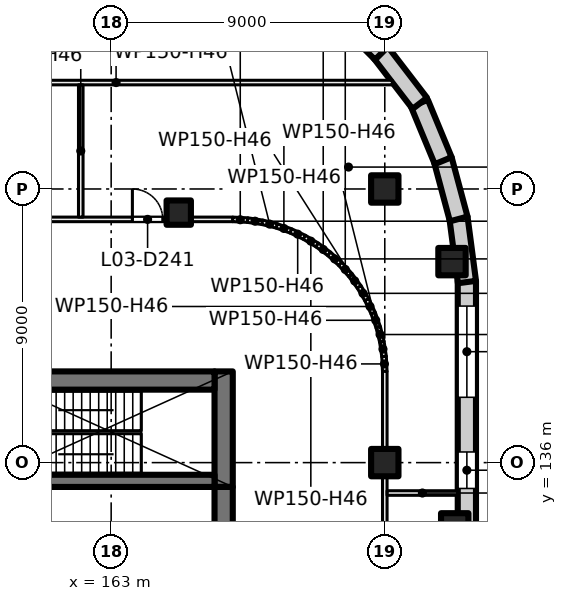
"""IFC4 building model, lengths in metres.
Left out: names, types, materials, properties, quantities, classifications, styles, units other than length and angle.
Written with IfcOpenShell. Run it as: python <this file> out.ifc"""

import sys

from ifc_helpers import new_model, si_unit, direction, frame, frame_2d, origin, origin_2d, place, context, subcontext, project, spatial, rectangle, extrude, element, fill, save


model = new_model("IFC4")
c1 = context("Model", 3, precision=1e-05, world=origin(), true_north=direction((0.0, 1.0)))
c2 = subcontext(c1, "Body", "Model", "MODEL_VIEW")
j1 = project(units=[si_unit("LENGTHUNIT", "METRE"), si_unit("PLANEANGLEUNIT", "RADIAN")], contexts=[c1])
p1 = place(None, origin())
s1 = spatial("IfcSite", under=j1, at=p1, CompositionType="ELEMENT")
p2 = place(p1, origin())
s2 = spatial("IfcBuilding", under=s1, at=p2, CompositionType="ELEMENT")
p3 = place(p2, frame((0.0, 0.0, 17.5)))
s3 = spatial("IfcBuildingStorey", under=s2, at=p3, CompositionType="ELEMENT", Elevation=17.5)
for number, where, z_axis, x_axis in (
    (1, (172.0, 136.0, 0.0), (0.0, 0.0, 1.0), (1.0, 0.0, 0.0)),
    (2, (172.0, 145.0, 0.0), (0.0, 0.0, 1.0), (1.0, 0.0, 0.0)),
    (3, (174.211, 142.611, 0.0), (0.0, 0.0, 1.0), (1.0, 0.0, 0.0)),
    (4, (174.3, 133.887, 0.0), (0.0, 0.0, 1.0), (1.0, 0.0, 0.0)),
):
    element("IfcColumn", number, at=place(p3, frame(where, z_axis=z_axis, x_axis=x_axis)), inside=s3, PredefinedType="COLUMN", context=c2, shape_type="SweptSolid", body=[
        extrude(rectangle(XDim=0.9, YDim=0.9, at=origin_2d()), origin(), (0.0, 0.0, 1.0), 5.0),
    ])
p4 = place(p3, frame((165.223, 144.223, 0.0), z_axis=(0.0, 0.0, 1.0), x_axis=(1.0, 0.0, 0.0)))
e5 = element("IfcColumn", 5, at=p4, inside=s3, PredefinedType="COLUMN", context=c2, shape_type="SweptSolid", body=[
    extrude(rectangle(XDim=0.8, YDim=0.8, at=origin_2d()), origin(), (0.0, 0.0, 1.0), 5.0),
])
p5 = place(p3, frame((166.7, 139.0, 0.0), z_axis=(0.0, 0.0, 1.0), x_axis=(0.0, -1.0, 0.0)))
e6 = element("IfcWall", 6, at=p5, inside=s3, PredefinedType="SHEAR", context=c2, shape_type="SweptSolid", body=[
    extrude(rectangle(XDim=3.8, YDim=0.6, at=frame_2d((1.9, 0.0))), origin(), (0.0, 0.0, 1.0), 5.0),
])
p6 = place(p3, frame((166.7, 135.2, 0.0), z_axis=(0.0, 0.0, 1.0), x_axis=(0.0, -1.0, 0.0)))
e7 = element("IfcWall", 7, at=p6, inside=s3, PredefinedType="SHEAR", context=c2, shape_type="SweptSolid", body=[
    extrude(rectangle(XDim=14.4, YDim=0.6, at=frame_2d((7.2, 0.0))), origin(), (0.0, 0.0, 1.0), 5.0),
])
p7 = place(p3, frame((166.4, 138.7, 0.0), z_axis=(0.0, 0.0, 1.0), x_axis=(-1.0, 0.0, 0.0)))
e8 = element("IfcWall", 8, at=p7, inside=s3, PredefinedType="SHEAR", context=c2, shape_type="SweptSolid", body=[
    extrude(rectangle(XDim=7.8, YDim=0.6, at=frame_2d((3.9, 0.0))), origin(), (0.0, 0.0, 1.0), 5.0),
])
p8 = place(p3, frame((166.4, 135.4, 0.0), z_axis=(0.0, 0.0, 1.0), x_axis=(-1.0, 0.0, 0.0)))
e9 = element("IfcWall", 9, at=p8, inside=s3, PredefinedType="SHEAR", context=c2, shape_type="SweptSolid", body=[
    extrude(rectangle(XDim=7.8, YDim=0.4, at=frame_2d((3.9, 0.0))), origin(), (0.0, 0.0, 1.0), 5.0),
])
p9 = place(p3, frame((174.7, 141.978, 0.0), z_axis=(0.0, 0.0, 1.0), x_axis=(0.0, -1.0, 0.0)))
e10 = element("IfcWall", 10, at=p9, inside=s3, PredefinedType="SOLIDWALL", context=c2, shape_type="SweptSolid", body=[
    extrude(rectangle(XDim=27.957, YDim=0.6, at=frame_2d((13.978, 0.0))), origin(), (0.0, 0.0, 1.0), 4.6),
])
p10 = place(p9, frame((0.83, 0.0, 0.9)))
e11 = element("IfcOpeningElement", 11, at=p10, cuts=e10, PredefinedType="OPENING", context=c2, shape_type="SweptSolid", body=[
    extrude(rectangle(XDim=3.0, YDim=3.0, at=frame_2d((1.5, 1.5))), frame((0.0, 0.31, 0.0), z_axis=(0.0, -1.0, 0.0), x_axis=(1.0, 0.0, 0.0)), (0.0, 0.0, 1.0), 0.62),
])
p11 = place(p9, frame((5.628, 0.0, 0.9)))
e12 = element("IfcOpeningElement", 12, at=p11, cuts=e10, PredefinedType="OPENING", context=c2, shape_type="SweptSolid", body=[
    extrude(rectangle(XDim=1.2, YDim=3.0, at=frame_2d((0.6, 1.5))), frame((0.0, 0.31, 0.0), z_axis=(0.0, -1.0, 0.0), x_axis=(1.0, 0.0, 0.0)), (0.0, 0.0, 1.0), 0.62),
])
p12 = place(p9, frame((10.148, 0.0, 0.9)))
e13 = element("IfcOpeningElement", 13, at=p12, cuts=e10, PredefinedType="OPENING", context=c2, shape_type="SweptSolid", body=[
    extrude(rectangle(XDim=3.0, YDim=3.0, at=frame_2d((1.5, 1.5))), frame((0.0, 0.31, 0.0), z_axis=(0.0, -1.0, 0.0), x_axis=(1.0, 0.0, 0.0)), (0.0, 0.0, 1.0), 0.62),
])
p13 = place(p9, frame((19.128, 0.0, 0.9)))
e14 = element("IfcOpeningElement", 14, at=p13, cuts=e10, PredefinedType="OPENING", context=c2, shape_type="SweptSolid", body=[
    extrude(rectangle(XDim=1.2, YDim=3.0, at=frame_2d((0.6, 1.5))), frame((0.0, 0.31, 0.0), z_axis=(0.0, -1.0, 0.0), x_axis=(1.0, 0.0, 0.0)), (0.0, 0.0, 1.0), 0.62),
])
p14 = place(p9, frame((20.628, 0.0, 0.9)))
e15 = element("IfcOpeningElement", 15, at=p14, cuts=e10, PredefinedType="OPENING", context=c2, shape_type="SweptSolid", body=[
    extrude(rectangle(XDim=1.2, YDim=3.0, at=frame_2d((0.6, 1.5))), frame((0.0, 0.31, 0.0), z_axis=(0.0, -1.0, 0.0), x_axis=(1.0, 0.0, 0.0)), (0.0, 0.0, 1.0), 0.62),
])
p15 = place(p3, frame((174.424, 144.052, 0.0), z_axis=(0.0, 0.0, 1.0), x_axis=(0.130558200013, -0.991440646942, 0.0)))
e16 = element("IfcWall", 16, at=p15, inside=s3, PredefinedType="SOLIDWALL", context=c2, shape_type="SweptSolid", body=[
    extrude(rectangle(XDim=2.132, YDim=0.6, at=frame_2d((1.066, 0.0))), origin(), (0.0, 0.0, 1.0), 4.6),
])
p16 = place(p3, frame((173.908, 145.968, 0.0), z_axis=(0.0, 0.0, 1.0), x_axis=(0.258804467146, -0.965929732323, 0.0)))
e17 = element("IfcWall", 17, at=p16, inside=s3, PredefinedType="SOLIDWALL", context=c2, shape_type="SweptSolid", body=[
    extrude(rectangle(XDim=2.022, YDim=0.6, at=frame_2d((1.011, 0.0))), origin(), (0.0, 0.0, 1.0), 4.6),
])
p17 = place(p3, frame((173.14, 147.819, 0.0), z_axis=(0.0, 0.0, 1.0), x_axis=(0.382341242798, -0.924021197839, 0.0)))
e18 = element("IfcWall", 18, at=p17, inside=s3, PredefinedType="SOLIDWALL", context=c2, shape_type="SweptSolid", body=[
    extrude(rectangle(XDim=2.044, YDim=0.6, at=frame_2d((1.022, 0.0))), origin(), (0.0, 0.0, 1.0), 4.6),
])
p18 = place(p3, frame((171.865, 149.493, 0.0), z_axis=(0.0, 0.0, 1.0), x_axis=(0.609052002567, -0.79313029079, 0.0)))
e19 = element("IfcWall", 19, at=p18, inside=s3, PredefinedType="SOLIDWALL", context=c2, shape_type="SweptSolid", body=[
    extrude(rectangle(XDim=2.114, YDim=0.6, at=frame_2d((1.057, 0.0))), origin(), (0.0, 0.0, 1.0), 4.6),
])
p19 = place(p3, frame((170.463, 150.89, 0.0), z_axis=(0.0, 0.0, 1.0), x_axis=(0.707106781187, -0.707106781187, 0.0)))
e20 = element("IfcWall", 20, at=p19, inside=s3, PredefinedType="SOLIDWALL", context=c2, shape_type="SweptSolid", body=[
    extrude(rectangle(XDim=2.018, YDim=0.6, at=frame_2d((1.009, 0.0))), origin(), (0.0, 0.0, 1.0), 4.6),
])
p20 = place(p3, frame((154.075, 144.0, 0.0), z_axis=(0.0, 0.0, 1.0), x_axis=(1.0, 0.0, 0.0)))
e21 = element("IfcWall", 21, at=p20, inside=s3, PredefinedType="PARTITIONING", context=c2, shape_type="SweptSolid", body=[
    extrude(rectangle(XDim=12.927, YDim=0.15, at=frame_2d((6.463, 0.0))), origin(), (0.0, 0.0, 1.0), 4.6),
])
p21 = place(p20, frame((2.427, 0.0, 0.0)))
e22 = element("IfcOpeningElement", 22, at=p21, cuts=e21, PredefinedType="OPENING", context=c2, shape_type="SweptSolid", body=[
    extrude(rectangle(XDim=1.0, YDim=2.1, at=frame_2d((0.5, 1.05))), frame((0.0, 0.085, 0.0), z_axis=(0.0, -1.0, 0.0), x_axis=(1.0, 0.0, 0.0)), (0.0, 0.0, 1.0), 0.17),
])
p22 = place(p20, frame((9.623, 0.0, 0.0)))
e23 = element("IfcOpeningElement", 23, at=p22, cuts=e21, PredefinedType="OPENING", context=c2, shape_type="SweptSolid", body=[
    extrude(rectangle(XDim=1.0, YDim=2.1, at=frame_2d((0.5, 1.05))), frame((0.0, 0.085, 0.0), z_axis=(0.0, -1.0, 0.0), x_axis=(1.0, 0.0, 0.0)), (0.0, 0.0, 1.0), 0.17),
])
p23 = place(p3, frame((154.075, 148.5, 0.0), z_axis=(0.0, 0.0, 1.0), x_axis=(1.0, 0.0, 0.0)))
e24 = element("IfcWall", 24, at=p23, inside=s3, PredefinedType="PARTITIONING", context=c2, shape_type="SweptSolid", body=[
    extrude(rectangle(XDim=18.173, YDim=0.15, at=frame_2d((9.086, 0.0))), origin(), (0.0, 0.0, 1.0), 4.6),
])
p24 = place(p3, frame((162.0, 144.075, 0.0), z_axis=(0.0, 0.0, 1.0), x_axis=(0.0, 1.0, 0.0)))
e25 = element("IfcWall", 25, at=p24, inside=s3, PredefinedType="PARTITIONING", context=c2, shape_type="SweptSolid", body=[
    extrude(rectangle(XDim=4.35, YDim=0.15, at=frame_2d((2.175, 0.0))), origin(), (0.0, 0.0, 1.0), 4.6),
])
p25 = place(p3, frame((166.998, 144.0, 0.0), z_axis=(0.0, 0.0, 1.0), x_axis=(0.998837896651, -0.048196018647, 0.0)))
e26 = element("IfcWall", 26, at=p25, inside=s3, PredefinedType="PARTITIONING", context=c2, shape_type="SweptSolid", body=[
    extrude(rectangle(XDim=0.496, YDim=0.15, at=frame_2d((0.248, 0.0))), origin(), (0.0, 0.0, 1.0), 4.6),
])
p26 = place(p3, frame((167.486, 143.977, 0.0), z_axis=(0.0, 0.0, 1.0), x_axis=(0.988925572052, -0.148412307247, 0.0)))
e27 = element("IfcWall", 27, at=p26, inside=s3, PredefinedType="PARTITIONING", context=c2, shape_type="SweptSolid", body=[
    extrude(rectangle(XDim=0.499, YDim=0.15, at=frame_2d((0.249, 0.0))), origin(), (0.0, 0.0, 1.0), 4.6),
])
p27 = place(p3, frame((167.971, 143.905, 0.0), z_axis=(0.0, 0.0, 1.0), x_axis=(0.970113715952, -0.242650732785, 0.0)))
e28 = element("IfcWall", 28, at=p27, inside=s3, PredefinedType="PARTITIONING", context=c2, shape_type="SweptSolid", body=[
    extrude(rectangle(XDim=0.499, YDim=0.15, at=frame_2d((0.25, 0.0))), origin(), (0.0, 0.0, 1.0), 4.6),
])
for number, where, z_axis, x_axis in (
    (29, (168.447, 143.786, 0.0), (0.0, 0.0, 1.0), (0.941, -0.337, 0.0)),
    (30, (168.91, 143.621, 0.0), (0.0, 0.0, 1.0), (0.904, -0.428, 0.0)),
):
    element("IfcWall", number, at=place(p3, frame(where, z_axis=z_axis, x_axis=x_axis)), inside=s3, PredefinedType="PARTITIONING", context=c2, shape_type="SweptSolid", body=[
        extrude(rectangle(XDim=0.498, YDim=0.15, at=frame_2d((0.249, 0.0))), origin(), (0.0, 0.0, 1.0), 4.6),
    ])
p28 = place(p3, frame((169.354, 143.412, 0.0), z_axis=(0.0, 0.0, 1.0), x_axis=(0.85671397893, -0.515791778052, 0.0)))
e31 = element("IfcWall", 31, at=p28, inside=s3, PredefinedType="PARTITIONING", context=c2, shape_type="SweptSolid", body=[
    extrude(rectangle(XDim=0.499, YDim=0.15, at=frame_2d((0.249, 0.0))), origin(), (0.0, 0.0, 1.0), 4.6),
])
p29 = place(p3, frame((169.775, 143.159, 0.0), z_axis=(0.0, 0.0, 1.0), x_axis=(0.80404358372, -0.594570362092, 0.0)))
e32 = element("IfcWall", 32, at=p29, inside=s3, PredefinedType="PARTITIONING", context=c2, shape_type="SweptSolid", body=[
    extrude(rectangle(XDim=0.498, YDim=0.15, at=frame_2d((0.249, 0.0))), origin(), (0.0, 0.0, 1.0), 4.6),
])
for number, where, z_axis, x_axis in (
    (33, (170.169, 142.867, 0.0), (0.0, 0.0, 1.0), (0.742, -0.67, 0.0)),
    (34, (170.533, 142.539, 0.0), (0.0, 0.0, 1.0), (0.67, -0.742, 0.0)),
):
    element("IfcWall", number, at=place(p3, frame(where, z_axis=z_axis, x_axis=x_axis)), inside=s3, PredefinedType="PARTITIONING", context=c2, shape_type="SweptSolid", body=[
        extrude(rectangle(XDim=0.499, YDim=0.15, at=frame_2d((0.249, 0.0))), origin(), (0.0, 0.0, 1.0), 4.6),
    ])
p30 = place(p3, frame((170.863, 142.175, 0.0), z_axis=(0.0, 0.0, 1.0), x_axis=(0.594570362092, -0.80404358372, 0.0)))
e35 = element("IfcWall", 35, at=p30, inside=s3, PredefinedType="PARTITIONING", context=c2, shape_type="SweptSolid", body=[
    extrude(rectangle(XDim=0.498, YDim=0.15, at=frame_2d((0.249, 0.0))), origin(), (0.0, 0.0, 1.0), 4.6),
])
p31 = place(p3, frame((171.155, 141.781, 0.0), z_axis=(0.0, 0.0, 1.0), x_axis=(0.515791778052, -0.85671397893, 0.0)))
e36 = element("IfcWall", 36, at=p31, inside=s3, PredefinedType="PARTITIONING", context=c2, shape_type="SweptSolid", body=[
    extrude(rectangle(XDim=0.499, YDim=0.15, at=frame_2d((0.249, 0.0))), origin(), (0.0, 0.0, 1.0), 4.6),
])
for number, where, z_axis, x_axis in (
    (37, (171.408, 141.36, 0.0), (0.0, 0.0, 1.0), (0.428, -0.904, 0.0)),
    (38, (171.618, 140.916, 0.0), (0.0, 0.0, 1.0), (0.337, -0.941, 0.0)),
):
    element("IfcWall", number, at=place(p3, frame(where, z_axis=z_axis, x_axis=x_axis)), inside=s3, PredefinedType="PARTITIONING", context=c2, shape_type="SweptSolid", body=[
        extrude(rectangle(XDim=0.498, YDim=0.15, at=frame_2d((0.249, 0.0))), origin(), (0.0, 0.0, 1.0), 4.6),
    ])
p32 = place(p3, frame((171.784, 140.455, 0.0), z_axis=(0.0, 0.0, 1.0), x_axis=(0.242650732785, -0.970113715952, 0.0)))
e39 = element("IfcWall", 39, at=p32, inside=s3, PredefinedType="PARTITIONING", context=c2, shape_type="SweptSolid", body=[
    extrude(rectangle(XDim=0.499, YDim=0.15, at=frame_2d((0.25, 0.0))), origin(), (0.0, 0.0, 1.0), 4.6),
])
p33 = place(p3, frame((171.903, 139.979, 0.0), z_axis=(0.0, 0.0, 1.0), x_axis=(0.148412307247, -0.988925572052, 0.0)))
e40 = element("IfcWall", 40, at=p33, inside=s3, PredefinedType="PARTITIONING", context=c2, shape_type="SweptSolid", body=[
    extrude(rectangle(XDim=0.499, YDim=0.15, at=frame_2d((0.249, 0.0))), origin(), (0.0, 0.0, 1.0), 4.6),
])
p34 = place(p3, frame((171.976, 139.494, 0.0), z_axis=(0.0, 0.0, 1.0), x_axis=(0.048196018647, -0.998837896651, 0.0)))
e41 = element("IfcWall", 41, at=p34, inside=s3, PredefinedType="PARTITIONING", context=c2, shape_type="SweptSolid", body=[
    extrude(rectangle(XDim=0.496, YDim=0.15, at=frame_2d((0.248, 0.0))), origin(), (0.0, 0.0, 1.0), 4.6),
])
p35 = place(p3, frame((172.0, 139.002, 0.0), z_axis=(0.0, 0.0, 1.0), x_axis=(0.0, -1.0, 0.0)))
e42 = element("IfcWall", 42, at=p35, inside=s3, PredefinedType="PARTITIONING", context=c2, shape_type="SweptSolid", body=[
    extrude(rectangle(XDim=22.004, YDim=0.15, at=frame_2d((11.002, 0.0))), origin(), (0.0, 0.0, 1.0), 4.6),
])
p36 = place(p35, frame((10.252, 0.0, 0.0)))
e43 = element("IfcOpeningElement", 43, at=p36, cuts=e42, PredefinedType="OPENING", context=c2, shape_type="SweptSolid", body=[
    extrude(rectangle(XDim=1.0, YDim=2.1, at=frame_2d((0.5, 1.05))), frame((0.0, 0.085, 0.0), z_axis=(0.0, -1.0, 0.0), x_axis=(1.0, 0.0, 0.0)), (0.0, 0.0, 1.0), 0.17),
])
p37 = place(p3, frame((172.075, 135.0, 0.0), z_axis=(0.0, 0.0, 1.0), x_axis=(1.0, 0.0, 0.0)))
e44 = element("IfcWall", 44, at=p37, inside=s3, PredefinedType="PARTITIONING", context=c2, shape_type="SweptSolid", body=[
    extrude(rectangle(XDim=2.325, YDim=0.15, at=frame_2d((1.163, 0.0))), origin(), (0.0, 0.0, 1.0), 4.6),
])
p38 = place(p10, origin())
e45 = element("IfcWindow", 45, at=p38, inside=s3, PartitioningType="SINGLE_PANEL", PredefinedType="WINDOW", context=c2, shape_type="SweptSolid", body=[
    extrude(rectangle(XDim=3.0, YDim=3.0, at=frame_2d((1.5, 1.5))), frame((0.0, 0.03, 0.0), z_axis=(0.0, -1.0, 0.0), x_axis=(1.0, 0.0, 0.0)), (0.0, 0.0, 1.0), 0.06),
])
fill(e11, e45)
p39 = place(p11, origin())
e46 = element("IfcWindow", 46, at=p39, inside=s3, PartitioningType="SINGLE_PANEL", PredefinedType="WINDOW", context=c2, shape_type="SweptSolid", body=[
    extrude(rectangle(XDim=1.2, YDim=3.0, at=frame_2d((0.6, 1.5))), frame((0.0, 0.03, 0.0), z_axis=(0.0, -1.0, 0.0), x_axis=(1.0, 0.0, 0.0)), (0.0, 0.0, 1.0), 0.06),
])
fill(e12, e46)
p40 = place(p22, origin())
e47 = element("IfcDoor", 47, at=p40, inside=s3, OperationType="SINGLE_SWING_LEFT", PredefinedType="DOOR", context=c2, shape_type="SweptSolid", body=[
    extrude(rectangle(XDim=1.0, YDim=2.1, at=frame_2d((0.5, 1.05))), frame((0.0, 0.025, 0.0), z_axis=(0.0, -1.0, 0.0), x_axis=(1.0, 0.0, 0.0)), (0.0, 0.0, 1.0), 0.05),
])
fill(e23, e47)
save(model, sys.argv[1])
